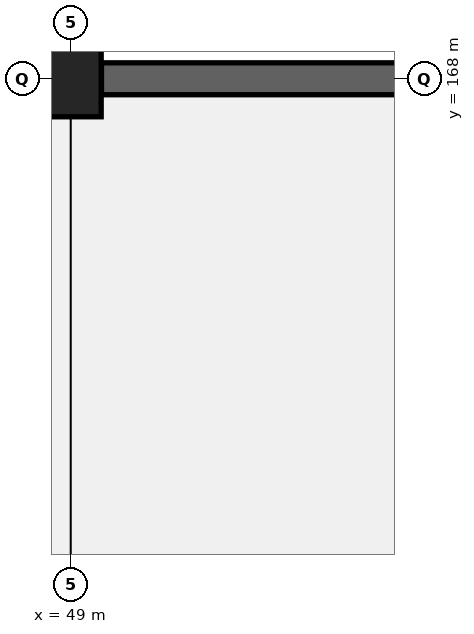
"""IFC4 building model, lengths in metres.
Left out: names, types, materials, properties, quantities, classifications, styles, units other than length and angle.
Written with IfcOpenShell. Run it as: python <this file> out.ifc"""

import sys

from ifc_helpers import new_model, si_unit, direction, frame, frame_2d, origin, origin_2d, place, context, subcontext, project, spatial, rectangle, extrude, element, save


model = new_model("IFC4")
c1 = context("Model", 3, precision=1e-05, world=origin(), true_north=direction((0.0, 1.0)))
c2 = subcontext(c1, "Body", "Model", "MODEL_VIEW")
j1 = project(units=[si_unit("LENGTHUNIT", "METRE"), si_unit("PLANEANGLEUNIT", "RADIAN")], contexts=[c1])
p1 = place(None, origin())
s1 = spatial("IfcSite", under=j1, at=p1, CompositionType="ELEMENT")
p2 = place(p1, origin())
s2 = spatial("IfcBuilding", under=s1, at=p2, CompositionType="ELEMENT")
p3 = place(p2, frame((0.0, 0.0, -4.8)))
s3 = spatial("IfcBuildingStorey", under=s2, at=p3, CompositionType="ELEMENT", Elevation=-4.8)
p4 = place(p3, frame((49.0, 168.0, 0.0), z_axis=(0.0, 0.0, 1.0), x_axis=(1.0, 0.0, 0.0)))
e1 = element("IfcColumn", 1, at=p4, inside=s3, PredefinedType="COLUMN", context=c2, shape_type="SweptSolid", body=[
    extrude(rectangle(XDim=0.8, YDim=1.0, at=origin_2d()), origin(), (0.0, 0.0, 1.0), 4.8),
])
p5 = place(p3, frame((49.404, 168.0, 0.0), z_axis=(0.0, 0.0, 1.0), x_axis=(1.0, 0.0, 0.0)))
e2 = element("IfcWall", 2, at=p5, inside=s3, PredefinedType="STANDARD", context=c2, shape_type="SweptSolid", body=[
    extrude(rectangle(XDim=11.667, YDim=0.42, at=frame_2d((5.833, 0.0))), origin(), (0.0, 0.0, 1.0), 4.46),
])
save(model, sys.argv[1])
